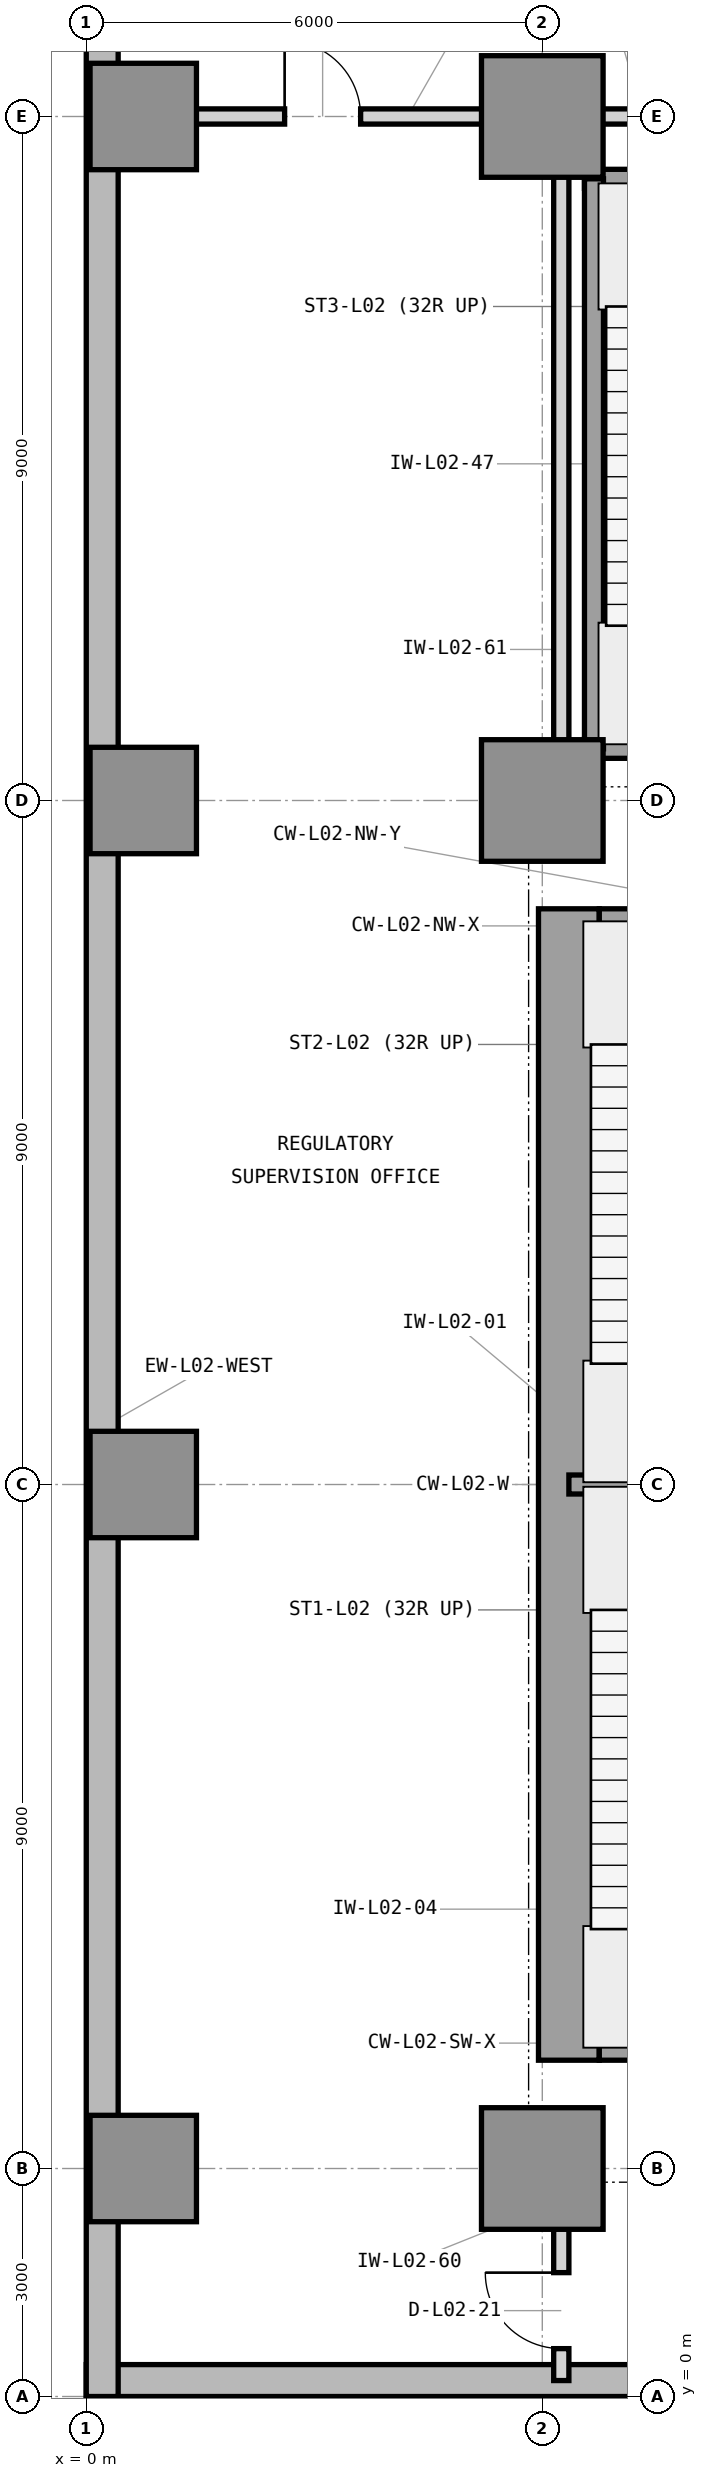
"""IFC4 building model, lengths in metres.
Left out: names, types, materials, properties, quantities, classifications, styles, units other than length and angle.
Written with IfcOpenShell. Run it as: python <this file> out.ifc"""

import sys

from ifc_helpers import new_model, si_unit, direction, frame, frame_2d, origin, origin_2d, place, context, subcontext, project, spatial, rectangle, extrude, element, fill, save


model = new_model("IFC4")
c1 = context("Model", 3, precision=1e-05, world=origin(), true_north=direction((0.0, 1.0)))
c2 = subcontext(c1, "Body", "Model", "MODEL_VIEW")
j1 = project(units=[si_unit("LENGTHUNIT", "METRE"), si_unit("PLANEANGLEUNIT", "RADIAN")], contexts=[c1])
p1 = place(None, origin())
s1 = spatial("IfcSite", under=j1, at=p1, CompositionType="ELEMENT")
p2 = place(p1, origin())
s2 = spatial("IfcBuilding", under=s1, at=p2, CompositionType="ELEMENT")
p3 = place(p2, frame((0.0, 0.0, 10.8)))
s3 = spatial("IfcBuildingStorey", under=s2, at=p3, CompositionType="ELEMENT", Elevation=10.8)
p4 = place(p3, frame((6.35, 4.425, 0.0), z_axis=(0.0, 0.0, 1.0), x_axis=(0.0, 1.0, 0.0)))
e1 = element("IfcWall", 1, at=p4, inside=s3, PredefinedType="SHEAR", context=c2, shape_type="SweptSolid", body=[
    extrude(rectangle(XDim=15.15, YDim=0.8, at=frame_2d((7.575, 0.0))), origin(), (0.0, 0.0, 1.0), 5.4),
])
for number, where, z_axis, x_axis in (
    (2, (6.75, 4.65, 0.0), (0.0, 0.0, 1.0), (1.0, 0.0, 0.0)),
    (3, (6.75, 19.35, 0.0), (0.0, 0.0, 1.0), (1.0, 0.0, 0.0)),
):
    element("IfcWall", number, at=place(p3, frame(where, z_axis=z_axis, x_axis=x_axis)), inside=s3, PredefinedType="SHEAR", context=c2, shape_type="SweptSolid", body=[
        extrude(rectangle(XDim=1.175, YDim=0.45, at=frame_2d((0.587, 0.0))), origin(), (0.0, 0.0, 1.0), 5.4),
    ])
for number, where, z_axis, x_axis in (
    (4, (0.75, 3.0, 0.0), (0.0, 0.0, 1.0), (1.0, 0.0, 0.0)),
    (5, (0.75, 12.0, 0.0), (0.0, 0.0, 1.0), (1.0, 0.0, 0.0)),
    (6, (0.75, 21.0, 0.0), (0.0, 0.0, 1.0), (1.0, 0.0, 0.0)),
    (7, (0.75, 30.0, 0.0), (0.0, 0.0, 1.0), (1.0, 0.0, 0.0)),
):
    element("IfcColumn", number, at=place(p3, frame(where, z_axis=z_axis, x_axis=x_axis)), inside=s3, PredefinedType="COLUMN", context=c2, shape_type="SweptSolid", body=[
        extrude(rectangle(XDim=1.4, YDim=1.4, at=origin_2d()), origin(), (0.0, 0.0, 1.0), 4.8),
    ])
for number, where, z_axis, x_axis in (
    (8, (6.0, 3.0, 0.0), (0.0, 0.0, 1.0), (1.0, 0.0, 0.0)),
    (9, (6.0, 21.0, 0.0), (0.0, 0.0, 1.0), (1.0, 0.0, 0.0)),
    (10, (6.0, 30.0, 0.0), (0.0, 0.0, 1.0), (1.0, 0.0, 0.0)),
):
    element("IfcColumn", number, at=place(p3, frame(where, z_axis=z_axis, x_axis=x_axis)), inside=s3, PredefinedType="COLUMN", context=c2, shape_type="SweptSolid", body=[
        extrude(rectangle(XDim=1.6, YDim=1.6, at=origin_2d()), origin(), (0.0, 0.0, 1.0), 4.8),
    ])
p5 = place(p3, frame((0.0, 0.21, 0.0), z_axis=(0.0, 0.0, 1.0), x_axis=(1.0, 0.0, 0.0)))
e11 = element("IfcWall", 11, at=p5, inside=s3, PredefinedType="STANDARD", context=c2, shape_type="SweptSolid", body=[
    extrude(rectangle(XDim=33.0, YDim=0.42, at=frame_2d((16.5, 0.0))), origin(), (0.0, 0.0, 1.0), 4.8),
])
p6 = place(p3, frame((0.21, 51.0, 0.0), z_axis=(0.0, 0.0, 1.0), x_axis=(0.0, -1.0, 0.0)))
e12 = element("IfcWall", 12, at=p6, inside=s3, PredefinedType="STANDARD", context=c2, shape_type="SweptSolid", body=[
    extrude(rectangle(XDim=51.0, YDim=0.42, at=frame_2d((25.5, 0.0))), origin(), (0.0, 0.0, 1.0), 4.8),
])
p7 = place(p3, frame((6.35, 12.0, 0.0), z_axis=(0.0, 0.0, 1.0), x_axis=(1.0, 0.0, 0.0)))
e13 = element("IfcWall", 13, at=p7, inside=s3, PredefinedType="SHEAR", context=c2, shape_type="SweptSolid", body=[
    extrude(rectangle(XDim=4.105, YDim=0.25, at=frame_2d((2.052, 0.0))), origin(), (0.0, 0.0, 1.0), 5.4),
])
for number, where, z_axis, x_axis in (
    (14, (6.555, 21.68, 0.0), (0.0, 0.0, 1.0), (1.0, 0.0, 0.0)),
    (15, (6.555, 29.18, 0.0), (0.0, 0.0, 1.0), (1.0, 0.0, 0.0)),
):
    element("IfcWall", number, at=place(p3, frame(where, z_axis=z_axis, x_axis=x_axis)), inside=s3, PredefinedType="SHEAR", context=c2, shape_type="SweptSolid", body=[
        extrude(rectangle(XDim=4.09, YDim=0.25, at=frame_2d((2.045, 0.0))), origin(), (0.0, 0.0, 1.0), 5.4),
    ])
p8 = place(p3, frame((6.68, 21.68, 0.0), z_axis=(0.0, 0.0, 1.0), x_axis=(0.0, 1.0, 0.0)))
e16 = element("IfcWall", 16, at=p8, inside=s3, PredefinedType="SHEAR", context=c2, shape_type="SweptSolid", body=[
    extrude(rectangle(XDim=7.5, YDim=0.25, at=frame_2d((3.75, 0.0))), origin(), (0.0, 0.0, 1.0), 5.4),
])
p9 = place(p3, frame((6.25, 0.21, 0.0), z_axis=(0.0, 0.0, 1.0), x_axis=(0.0, 1.0, 0.0)))
e17 = element("IfcWall", 17, at=p9, inside=s3, PredefinedType="PARTITIONING", context=c2, shape_type="SweptSolid", body=[
    extrude(rectangle(XDim=3.14, YDim=0.2, at=frame_2d((1.57, 0.0))), origin(), (0.0, 0.0, 1.0), 4.79),
])
p10 = place(p9, frame((0.42, 0.0, 0.0)))
e18 = element("IfcOpeningElement", 18, at=p10, cuts=e17, PredefinedType="OPENING", context=c2, shape_type="SweptSolid", body=[
    extrude(rectangle(XDim=1.0, YDim=2.15, at=frame_2d((0.5, 1.075))), frame((0.0, 0.11, 0.0), z_axis=(0.0, -1.0, 0.0), x_axis=(1.0, 0.0, 0.0)), (0.0, 0.0, 1.0), 0.22),
])
p11 = place(p3, frame((6.25, 20.65, 0.0), z_axis=(0.0, 0.0, 1.0), x_axis=(0.0, 1.0, 0.0)))
e19 = element("IfcWall", 19, at=p11, inside=s3, PredefinedType="PARTITIONING", context=c2, shape_type="SweptSolid", body=[
    extrude(rectangle(XDim=9.35, YDim=0.2, at=frame_2d((4.675, 0.0))), origin(), (0.0, 0.0, 1.0), 3.19),
])
p12 = place(p3, frame((0.21, 30.0, 0.0), z_axis=(0.0, 0.0, 1.0), x_axis=(1.0, 0.0, 0.0)))
e20 = element("IfcWall", 20, at=p12, inside=s3, PredefinedType="PARTITIONING", context=c2, shape_type="SweptSolid", body=[
    extrude(rectangle(XDim=8.04, YDim=0.2, at=frame_2d((4.02, 0.0))), origin(), (0.0, 0.0, 1.0), 3.85),
])
p13 = place(p12, frame((2.4, 0.0, 0.0)))
e21 = element("IfcOpeningElement", 21, at=p13, cuts=e20, PredefinedType="OPENING", context=c2, shape_type="SweptSolid", body=[
    extrude(rectangle(XDim=1.0, YDim=2.15, at=frame_2d((0.5, 1.075))), frame((0.0, 0.11, 0.0), z_axis=(0.0, -1.0, 0.0), x_axis=(1.0, 0.0, 0.0)), (0.0, 0.0, 1.0), 0.22),
])
p14 = place(p10, origin())
e22 = element("IfcDoor", 22, at=p14, inside=s3, OperationType="SINGLE_SWING_RIGHT", PredefinedType="DOOR", context=c2, shape_type="SweptSolid", body=[
    extrude(rectangle(XDim=1.0, YDim=2.15, at=frame_2d((0.5, 1.075))), frame((0.0, 0.025, 0.0), z_axis=(0.0, -1.0, 0.0), x_axis=(1.0, 0.0, 0.0)), (0.0, 0.0, 1.0), 0.05),
])
fill(e18, e22)
p15 = place(p13, origin())
e23 = element("IfcDoor", 23, at=p15, inside=s3, OperationType="SINGLE_SWING_LEFT", PredefinedType="DOOR", context=c2, shape_type="SweptSolid", body=[
    extrude(rectangle(XDim=1.0, YDim=2.15, at=frame_2d((0.5, 1.075))), frame((0.0, 0.025, 0.0), z_axis=(0.0, -1.0, 0.0), x_axis=(1.0, 0.0, 0.0)), (0.0, 0.0, 1.0), 0.05),
])
fill(e21, e23)
save(model, sys.argv[1])
